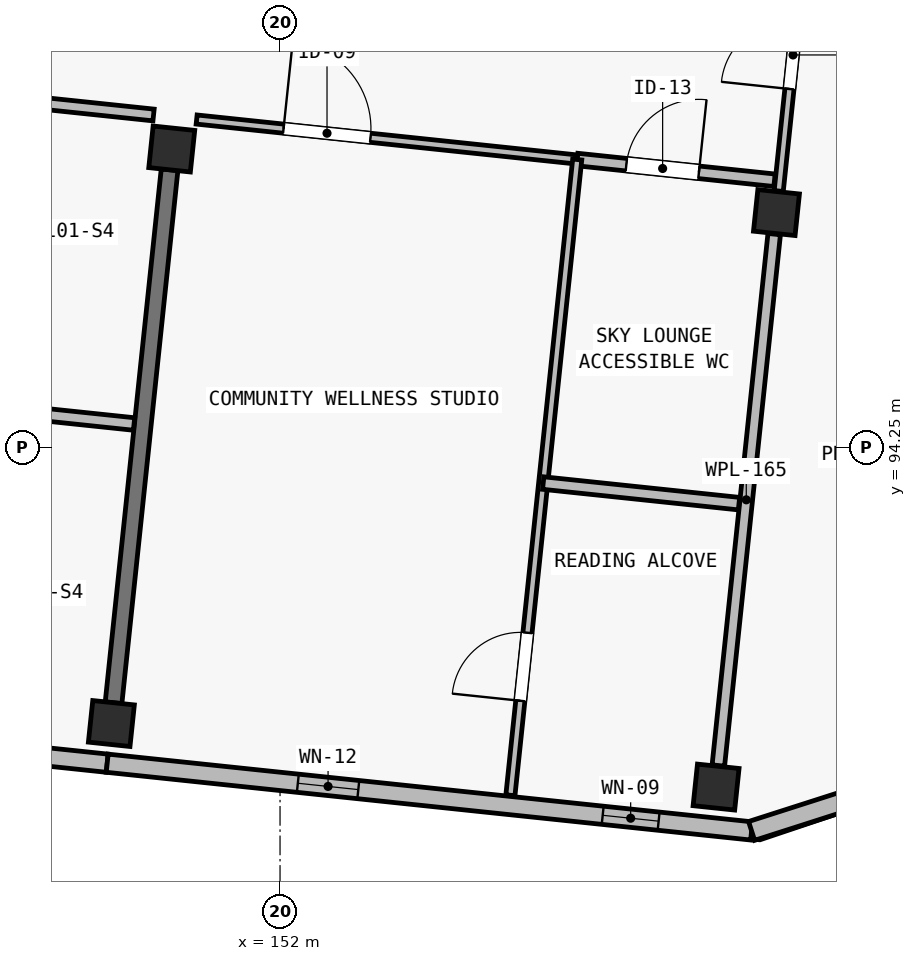
"""IFC4 building model, lengths in metres.
Left out: names, types, materials, properties, quantities, classifications, styles, units other than length and angle.
Written with IfcOpenShell. Run it as: python <this file> out.ifc"""

import sys

from ifc_helpers import new_model, si_unit, direction, frame, frame_2d, origin, origin_2d, place, context, subcontext, project, spatial, rectangle, extrude, element, fill, save


model = new_model("IFC4")
c1 = context("Model", 3, precision=1e-05, world=origin(), true_north=direction((0.0, 1.0)))
c2 = subcontext(c1, "Body", "Model", "MODEL_VIEW")
j1 = project(units=[si_unit("LENGTHUNIT", "METRE"), si_unit("PLANEANGLEUNIT", "RADIAN")], contexts=[c1])
p1 = place(None, origin())
s1 = spatial("IfcSite", under=j1, at=p1, CompositionType="ELEMENT")
p2 = place(p1, origin())
s2 = spatial("IfcBuilding", under=s1, at=p2, CompositionType="ELEMENT")
p3 = place(p2, frame((0.0, 0.0, 4.5)))
s3 = spatial("IfcBuildingStorey", under=s2, at=p3, CompositionType="ELEMENT", Elevation=4.5)
for number, where, z_axis, x_axis in (
    (1, (149.781, 90.619, 0.0), (0.0, 0.0, 1.0), (0.995, -0.105, 0.0)),
    (2, (150.575, 98.177, 0.0), (0.0, 0.0, 1.0), (0.995, -0.105, 0.0)),
    (3, (157.737, 89.783, 0.0), (0.0, 0.0, 1.0), (0.995, -0.105, 0.0)),
    (4, (158.531, 97.341, 0.0), (0.0, 0.0, 1.0), (0.995, -0.105, 0.0)),
):
    element("IfcColumn", number, at=place(p3, frame(where, z_axis=z_axis, x_axis=x_axis)), inside=s3, PredefinedType="COLUMN", context=c2, shape_type="SweptSolid", body=[
        extrude(rectangle(XDim=0.55, YDim=0.55, at=origin_2d()), origin(), (0.0, 0.0, 1.0), 3.9),
    ])
p4 = place(p3, frame((149.81, 90.892, -0.25), z_axis=(0.0, 0.0, 1.0), x_axis=(0.104545981508, 0.994520053971, 0.0)))
e5 = element("IfcWall", 5, at=p4, inside=s3, PredefinedType="SHEAR", context=c2, shape_type="SweptSolid", body=[
    extrude(rectangle(XDim=7.05, YDim=0.22, at=frame_2d((3.525, 0.0))), origin(), (0.0, 0.0, 1.0), 3.4),
])
p5 = place(p3, frame((149.726, 90.097, 0.0), z_axis=(0.0, 0.0, 1.0), x_axis=(-0.994522662826, 0.104521161134, 0.0)))
e6 = element("IfcWall", 6, at=p5, inside=s3, PredefinedType="SOLIDWALL", context=c2, shape_type="SweptSolid", body=[
    extrude(rectangle(XDim=8.0, YDim=0.24, at=frame_2d((4.0, 0.0))), origin(), (0.0, 0.0, 1.0), 3.65),
])
p6 = place(p5, frame((2.001, 0.0, 0.52)))
e7 = element("IfcOpeningElement", 7, at=p6, cuts=e6, PredefinedType="OPENING", context=c2, shape_type="SweptSolid", body=[
    extrude(rectangle(XDim=0.64, YDim=2.18, at=frame_2d((0.32, 1.09))), frame((0.0, 0.135, 0.0), z_axis=(0.0, -1.0, 0.0), x_axis=(1.0, 0.0, 0.0)), (0.0, 0.0, 1.0), 0.27),
])
p7 = place(p5, frame((5.1, 0.0, 0.52)))
e8 = element("IfcOpeningElement", 8, at=p7, cuts=e6, PredefinedType="OPENING", context=c2, shape_type="SweptSolid", body=[
    extrude(rectangle(XDim=0.7, YDim=2.36, at=frame_2d((0.35, 1.18))), frame((0.0, 0.135, 0.0), z_axis=(0.0, -1.0, 0.0), x_axis=(1.0, 0.0, 0.0)), (0.0, 0.0, 1.0), 0.27),
])
p8 = place(p5, frame((6.67, 0.0, 0.42)))
e9 = element("IfcOpeningElement", 9, at=p8, cuts=e6, PredefinedType="OPENING", context=c2, shape_type="SweptSolid", body=[
    extrude(rectangle(XDim=0.72, YDim=2.16, at=frame_2d((0.36, 1.08))), frame((0.0, 0.135, 0.0), z_axis=(0.0, -1.0, 0.0), x_axis=(1.0, 0.0, 0.0)), (0.0, 0.0, 1.0), 0.27),
])
p9 = place(p3, frame((158.204, 89.206, 0.0), z_axis=(0.0, 0.0, 1.0), x_axis=(-0.994521760736, 0.104529744196, 0.0)))
e10 = element("IfcWall", 10, at=p9, inside=s3, PredefinedType="SOLIDWALL", context=c2, shape_type="SweptSolid", body=[
    extrude(rectangle(XDim=8.525, YDim=0.24, at=frame_2d((4.262, 0.0))), origin(), (0.0, 0.0, 1.0), 3.65),
])
p10 = place(p9, frame((1.23, 0.0, 0.42)))
e11 = element("IfcOpeningElement", 11, at=p10, cuts=e10, PredefinedType="OPENING", context=c2, shape_type="SweptSolid", body=[
    extrude(rectangle(XDim=0.74, YDim=2.26, at=frame_2d((0.37, 1.13))), frame((0.0, 0.135, 0.0), z_axis=(0.0, -1.0, 0.0), x_axis=(1.0, 0.0, 0.0)), (0.0, 0.0, 1.0), 0.27),
])
p11 = place(p9, frame((5.203, 0.0, 0.42)))
e12 = element("IfcOpeningElement", 12, at=p11, cuts=e10, PredefinedType="OPENING", context=c2, shape_type="SweptSolid", body=[
    extrude(rectangle(XDim=0.8, YDim=2.3, at=frame_2d((0.4, 1.15))), frame((0.0, 0.135, 0.0), z_axis=(0.0, -1.0, 0.0), x_axis=(1.0, 0.0, 0.0)), (0.0, 0.0, 1.0), 0.27),
])
p12 = place(p3, frame((165.587, 91.572, 0.0), z_axis=(0.0, 0.0, 1.0), x_axis=(-0.9522851043, -0.305209895201, 0.0)))
e13 = element("IfcWall", 13, at=p12, inside=s3, PredefinedType="SOLIDWALL", context=c2, shape_type="SweptSolid", body=[
    extrude(rectangle(XDim=7.753, YDim=0.26, at=frame_2d((3.876, 0.0))), origin(), (0.0, 0.0, 1.0), 3.65),
])
p13 = place(p12, frame((2.63, 0.0, 0.52)))
e14 = element("IfcOpeningElement", 14, at=p13, cuts=e13, PredefinedType="OPENING", context=c2, shape_type="SweptSolid", body=[
    extrude(rectangle(XDim=0.86, YDim=2.36, at=frame_2d((0.43, 1.18))), frame((0.0, 0.145, 0.0), z_axis=(0.0, -1.0, 0.0), x_axis=(1.0, 0.0, 0.0)), (0.0, 0.0, 1.0), 0.29),
])
p14 = place(p12, frame((4.063, 0.0, 0.45)))
e15 = element("IfcOpeningElement", 15, at=p14, cuts=e13, PredefinedType="OPENING", context=c2, shape_type="SweptSolid", body=[
    extrude(rectangle(XDim=0.7, YDim=2.36, at=frame_2d((0.35, 1.18))), frame((0.0, 0.145, 0.0), z_axis=(0.0, -1.0, 0.0), x_axis=(1.0, 0.0, 0.0)), (0.0, 0.0, 1.0), 0.29),
])
p15 = place(p3, frame((158.561, 97.625, 0.0), z_axis=(0.0, 0.0, 1.0), x_axis=(0.104545412893, 0.994520113745, 0.0)))
e16 = element("IfcWall", 16, at=p15, inside=s3, PredefinedType="PARTITIONING", context=c2, shape_type="SweptSolid", body=[
    extrude(rectangle(XDim=3.83, YDim=0.12, at=frame_2d((1.915, 0.0))), origin(), (0.0, 0.0, 1.0), 3.15),
])
p16 = place(p15, frame((1.35, 0.0, 0.0)))
e17 = element("IfcOpeningElement", 17, at=p16, cuts=e16, PredefinedType="OPENING", context=c2, shape_type="SweptSolid", body=[
    extrude(rectangle(XDim=0.9, YDim=2.1, at=frame_2d((0.45, 1.05))), frame((0.0, 0.075, 0.0), z_axis=(0.0, -1.0, 0.0), x_axis=(1.0, 0.0, 0.0)), (0.0, 0.0, 1.0), 0.15),
])
p17 = place(p3, frame((157.767, 90.066, 0.0), z_axis=(0.0, 0.0, 1.0), x_axis=(0.104532929154, 0.994521425975, 0.0)))
e18 = element("IfcWall", 18, at=p17, inside=s3, PredefinedType="PLUMBINGWALL", context=c2, shape_type="SweptSolid", body=[
    extrude(rectangle(XDim=7.03, YDim=0.165, at=frame_2d((3.515, 0.0))), origin(), (0.0, 0.0, 1.0), 3.15),
])
p18 = place(p3, frame((142.947, 99.401, 0.0), z_axis=(0.0, 0.0, 1.0), x_axis=(0.994522184982, -0.104525707739, 0.0)))
e19 = element("IfcWall", 19, at=p18, inside=s3, PredefinedType="PARTITIONING", context=c2, shape_type="SweptSolid", body=[
    extrude(rectangle(XDim=7.43, YDim=0.155, at=frame_2d((3.715, 0.0))), origin(), (0.0, 0.0, 1.0), 3.62),
])
p19 = place(p18, frame((1.405, 0.0, 0.0)))
e20 = element("IfcOpeningElement", 20, at=p19, cuts=e19, PredefinedType="OPENING", context=c2, shape_type="SweptSolid", body=[
    extrude(rectangle(XDim=0.98, YDim=2.15, at=frame_2d((0.49, 1.075))), frame((0.0, 0.093, 0.0), z_axis=(0.0, -1.0, 0.0), x_axis=(1.0, 0.0, 0.0)), (0.0, 0.0, 1.0), 0.185),
])
p20 = place(p3, frame((146.216, 94.965, 0.0), z_axis=(0.0, 0.0, 1.0), x_axis=(0.994524375082, -0.104504867671, 0.0)))
e21 = element("IfcWall", 21, at=p20, inside=s3, PredefinedType="PLUMBINGWALL", context=c2, shape_type="SweptSolid", body=[
    extrude(rectangle(XDim=3.885, YDim=0.165, at=frame_2d((1.942, 0.0))), origin(), (0.0, 0.0, 1.0), 3.62),
])
p21 = place(p20, frame((1.4, 0.0, 0.0)))
e22 = element("IfcOpeningElement", 22, at=p21, cuts=e21, PredefinedType="OPENING", context=c2, shape_type="SweptSolid", body=[
    extrude(rectangle(XDim=0.82, YDim=2.08, at=frame_2d((0.41, 1.04))), frame((0.0, 0.097, 0.0), z_axis=(0.0, -1.0, 0.0), x_axis=(1.0, 0.0, 0.0)), (0.0, 0.0, 1.0), 0.195),
])
p22 = place(p3, frame((150.903, 98.565, 0.0), z_axis=(0.0, 0.0, 1.0), x_axis=(0.994520851776, -0.104538391908, 0.0)))
e23 = element("IfcWall", 23, at=p22, inside=s3, PredefinedType="PARTITIONING", context=c2, shape_type="SweptSolid", body=[
    extrude(rectangle(XDim=5.035, YDim=0.12, at=frame_2d((2.518, 0.0))), origin(), (0.0, 0.0, 1.0), 3.62),
])
p23 = place(p22, frame((1.15, 0.0, 0.0)))
e24 = element("IfcOpeningElement", 24, at=p23, cuts=e23, PredefinedType="OPENING", context=c2, shape_type="SweptSolid", body=[
    extrude(rectangle(XDim=1.15, YDim=2.15, at=frame_2d((0.575, 1.075))), frame((0.0, 0.075, 0.0), z_axis=(0.0, -1.0, 0.0), x_axis=(1.0, 0.0, 0.0)), (0.0, 0.0, 1.0), 0.15),
])
p24 = place(p3, frame((155.91, 98.039, 0.0), z_axis=(0.0, 0.0, 1.0), x_axis=(0.994526447543, -0.104485143144, 0.0)))
e25 = element("IfcWall", 25, at=p24, inside=s3, PredefinedType="PLUMBINGWALL", context=c2, shape_type="SweptSolid", body=[
    extrude(rectangle(XDim=2.61, YDim=0.165, at=frame_2d((1.305, 0.0))), origin(), (0.0, 0.0, 1.0), 3.62),
])
p25 = place(p24, frame((0.65, 0.0, 0.0)))
e26 = element("IfcOpeningElement", 26, at=p25, cuts=e25, PredefinedType="OPENING", context=c2, shape_type="SweptSolid", body=[
    extrude(rectangle(XDim=0.96, YDim=2.12, at=frame_2d((0.48, 1.06))), frame((0.0, 0.097, 0.0), z_axis=(0.0, -1.0, 0.0), x_axis=(1.0, 0.0, 0.0)), (0.0, 0.0, 1.0), 0.195),
])
p26 = place(p3, frame((155.031, 89.675, 0.0), z_axis=(0.0, 0.0, 1.0), x_axis=(0.10453518206, 0.994521189172, 0.0)))
e27 = element("IfcWall", 27, at=p26, inside=s3, PredefinedType="PARTITIONING", context=c2, shape_type="SweptSolid", body=[
    extrude(rectangle(XDim=8.41, YDim=0.12, at=frame_2d((4.205, 0.0))), origin(), (0.0, 0.0, 1.0), 3.62),
])
p27 = place(p26, frame((1.25, 0.0, 0.0)))
e28 = element("IfcOpeningElement", 28, at=p27, cuts=e27, PredefinedType="OPENING", context=c2, shape_type="SweptSolid", body=[
    extrude(rectangle(XDim=0.9, YDim=2.1, at=frame_2d((0.45, 1.05))), frame((0.0, 0.075, 0.0), z_axis=(0.0, -1.0, 0.0), x_axis=(1.0, 0.0, 0.0)), (0.0, 0.0, 1.0), 0.15),
])
p28 = place(p3, frame((155.463, 93.782, 0.0), z_axis=(0.0, 0.0, 1.0), x_axis=(0.994521452323, -0.104532678478, 0.0)))
e29 = element("IfcWall", 29, at=p28, inside=s3, PredefinedType="PLUMBINGWALL", context=c2, shape_type="SweptSolid", body=[
    extrude(rectangle(XDim=2.59, YDim=0.165, at=frame_2d((1.295, 0.0))), origin(), (0.0, 0.0, 1.0), 3.62),
])
p29 = place(p10, origin())
e30 = element("IfcWindow", 30, at=p29, inside=s3, PartitioningType="SINGLE_PANEL", PredefinedType="WINDOW", context=c2, shape_type="SweptSolid", body=[
    extrude(rectangle(XDim=0.74, YDim=2.26, at=frame_2d((0.37, 1.13))), frame((0.0, 0.03, 0.0), z_axis=(0.0, -1.0, 0.0), x_axis=(1.0, 0.0, 0.0)), (0.0, 0.0, 1.0), 0.06),
])
fill(e11, e30)
p30 = place(p11, origin())
e31 = element("IfcWindow", 31, at=p30, inside=s3, PartitioningType="SINGLE_PANEL", PredefinedType="WINDOW", context=c2, shape_type="SweptSolid", body=[
    extrude(rectangle(XDim=0.8, YDim=2.3, at=frame_2d((0.4, 1.15))), frame((0.0, 0.03, 0.0), z_axis=(0.0, -1.0, 0.0), x_axis=(1.0, 0.0, 0.0)), (0.0, 0.0, 1.0), 0.06),
])
fill(e12, e31)
p31 = place(p16, origin())
e32 = element("IfcDoor", 32, at=p31, inside=s3, OperationType="SINGLE_SWING_LEFT", PredefinedType="DOOR", context=c2, shape_type="SweptSolid", body=[
    extrude(rectangle(XDim=0.9, YDim=2.1, at=frame_2d((0.45, 1.05))), frame((0.0, 0.025, 0.0), z_axis=(0.0, -1.0, 0.0), x_axis=(1.0, 0.0, 0.0)), (0.0, 0.0, 1.0), 0.05),
])
fill(e17, e32)
p32 = place(p23, origin())
e33 = element("IfcDoor", 33, at=p32, inside=s3, OperationType="SINGLE_SWING_LEFT", PredefinedType="DOOR", context=c2, shape_type="SweptSolid", body=[
    extrude(rectangle(XDim=1.15, YDim=2.15, at=frame_2d((0.575, 1.075))), frame((0.0, 0.025, 0.0), z_axis=(0.0, -1.0, 0.0), x_axis=(1.0, 0.0, 0.0)), (0.0, 0.0, 1.0), 0.05),
])
fill(e24, e33)
p33 = place(p25, origin())
e34 = element("IfcDoor", 34, at=p33, inside=s3, OperationType="SINGLE_SWING_RIGHT", PredefinedType="DOOR", context=c2, shape_type="SweptSolid", body=[
    extrude(rectangle(XDim=0.96, YDim=2.12, at=frame_2d((0.48, 1.06))), frame((0.0, 0.025, 0.0), z_axis=(0.0, -1.0, 0.0), x_axis=(1.0, 0.0, 0.0)), (0.0, 0.0, 1.0), 0.05),
])
fill(e26, e34)
p34 = place(p27, origin())
e35 = element("IfcDoor", 35, at=p34, inside=s3, OperationType="SINGLE_SWING_LEFT", PredefinedType="DOOR", context=c2, shape_type="SweptSolid", body=[
    extrude(rectangle(XDim=0.9, YDim=2.1, at=frame_2d((0.45, 1.05))), frame((0.0, 0.025, 0.0), z_axis=(0.0, -1.0, 0.0), x_axis=(1.0, 0.0, 0.0)), (0.0, 0.0, 1.0), 0.05),
])
fill(e28, e35)
save(model, sys.argv[1])
